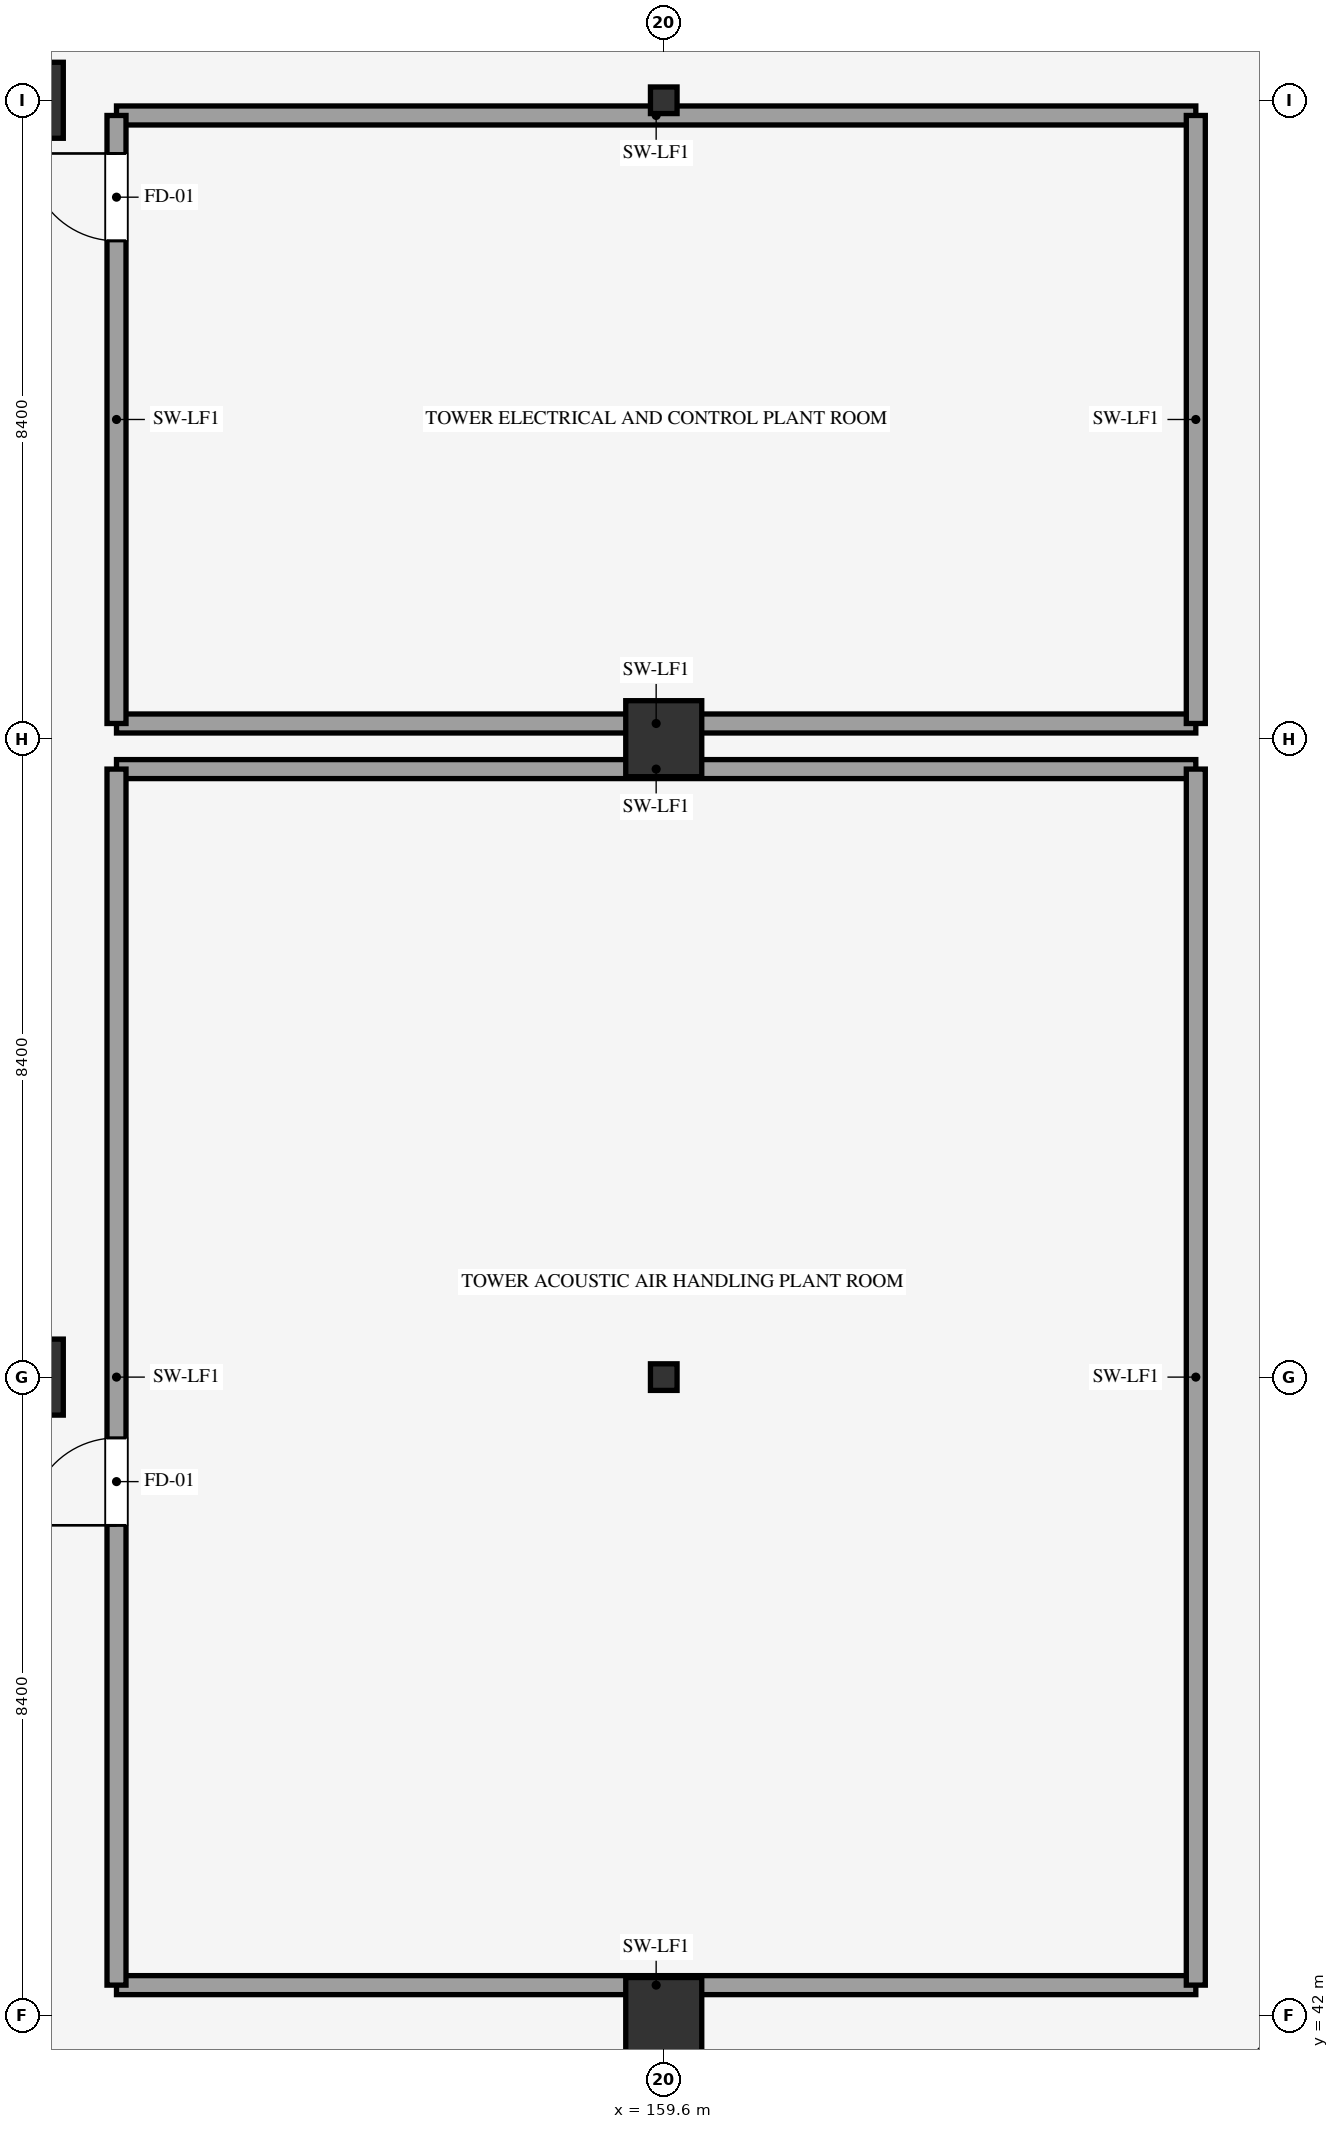
"""IFC4 building model, lengths in metres.
Left out: names, types, materials, properties, quantities, classifications, styles, units other than length and angle.
Written with IfcOpenShell. Run it as: python <this file> out.ifc"""

import sys

from ifc_helpers import new_model, si_unit, direction, frame, frame_2d, origin, origin_2d, place, context, subcontext, project, spatial, rectangle, i_section, extrude, element, fill, save


model = new_model("IFC4")
c1 = context("Model", 3, precision=1e-05, world=origin(), true_north=direction((0.0, 1.0)))
c2 = subcontext(c1, "Body", "Model", "MODEL_VIEW")
j1 = project(units=[si_unit("LENGTHUNIT", "METRE"), si_unit("PLANEANGLEUNIT", "RADIAN")], contexts=[c1])
p1 = place(None, origin())
s1 = spatial("IfcSite", under=j1, at=p1, CompositionType="ELEMENT")
p2 = place(p1, origin())
s2 = spatial("IfcBuilding", under=s1, at=p2, CompositionType="ELEMENT")
p3 = place(p2, frame((0.0, 0.0, 40.5)))
s3 = spatial("IfcBuildingStorey", under=s2, at=p3, CompositionType="ELEMENT", Elevation=40.5)
for number, where, z_axis, x_axis in (
    (1, (151.2, 50.4, 0.0), (0.0, 0.0, 1.0), (1.0, 0.0, 0.0)),
    (2, (151.2, 67.2, 0.0), (0.0, 0.0, 1.0), (1.0, 0.0, 0.0)),
    (3, (159.6, 42.0, 0.0), (0.0, 0.0, 1.0), (1.0, 0.0, 0.0)),
):
    element("IfcColumn", number, at=place(p3, frame(where, z_axis=z_axis, x_axis=x_axis)), inside=s3, PredefinedType="COLUMN", context=c2, shape_type="SweptSolid", body=[
        extrude(rectangle(XDim=1.0, YDim=1.0, at=origin_2d()), origin(), (0.0, 0.0, 1.0), 4.2),
    ])
p4 = place(p3, frame((159.6, 50.4, 0.0), z_axis=(0.0, 0.0, 1.0), x_axis=(1.0, 0.0, 0.0)))
e4 = element("IfcColumn", 4, at=p4, inside=s3, PredefinedType="COLUMN", context=c2, shape_type="SweptSolid", body=[
    extrude(i_section(OverallWidth=0.35, OverallDepth=0.35, WebThickness=0.012, FlangeThickness=0.019, FilletRadius=0.02, at=origin_2d()), origin(), (0.0, 0.0, 1.0), 4.2),
])
p5 = place(p3, frame((159.6, 58.8, 0.0), z_axis=(0.0, 0.0, 1.0), x_axis=(1.0, 0.0, 0.0)))
e5 = element("IfcColumn", 5, at=p5, inside=s3, PredefinedType="COLUMN", context=c2, shape_type="SweptSolid", body=[
    extrude(rectangle(XDim=1.0, YDim=1.0, at=origin_2d()), origin(), (0.0, 0.0, 1.0), 4.2),
])
p6 = place(p3, frame((159.6, 67.2, 0.0), z_axis=(0.0, 0.0, 1.0), x_axis=(1.0, 0.0, 0.0)))
e6 = element("IfcColumn", 6, at=p6, inside=s3, PredefinedType="COLUMN", context=c2, shape_type="SweptSolid", body=[
    extrude(i_section(OverallWidth=0.35, OverallDepth=0.35, WebThickness=0.012, FlangeThickness=0.019, FilletRadius=0.02, at=origin_2d()), origin(), (0.0, 0.0, 1.0), 4.2),
])
for number, where, z_axis, x_axis in (
    (7, (152.4, 42.4, 0.0), (0.0, 0.0, 1.0), (1.0, 0.0, 0.0)),
    (8, (152.4, 58.4, 0.0), (0.0, 0.0, 1.0), (1.0, 0.0, 0.0)),
):
    element("IfcWall", number, at=place(p3, frame(where, z_axis=z_axis, x_axis=x_axis)), inside=s3, PredefinedType="SHEAR", context=c2, shape_type="SweptSolid", body=[
        extrude(rectangle(XDim=14.2, YDim=0.25, at=frame_2d((7.1, 0.0))), origin(), (0.0, 0.0, 1.0), 3.96),
    ])
p7 = place(p3, frame((152.4, 42.4, 0.0), z_axis=(0.0, 0.0, 1.0), x_axis=(0.0, 1.0, 0.0)))
e9 = element("IfcWall", 9, at=p7, inside=s3, PredefinedType="SHEAR", context=c2, shape_type="SweptSolid", body=[
    extrude(rectangle(XDim=16.0, YDim=0.25, at=frame_2d((8.0, 0.0))), origin(), (0.0, 0.0, 1.0), 3.96),
])
p8 = place(p7, frame((6.05, 0.0, 0.0)))
e10 = element("IfcOpeningElement", 10, at=p8, cuts=e9, PredefinedType="OPENING", context=c2, shape_type="SweptSolid", body=[
    extrude(rectangle(XDim=1.15, YDim=2.15, at=frame_2d((0.575, 1.075))), frame((0.0, 0.135, 0.0), z_axis=(0.0, -1.0, 0.0), x_axis=(1.0, 0.0, 0.0)), (0.0, 0.0, 1.0), 0.27),
])
p9 = place(p3, frame((166.6, 42.4, 0.0), z_axis=(0.0, 0.0, 1.0), x_axis=(0.0, 1.0, 0.0)))
e11 = element("IfcWall", 11, at=p9, inside=s3, PredefinedType="SHEAR", context=c2, shape_type="SweptSolid", body=[
    extrude(rectangle(XDim=16.0, YDim=0.25, at=frame_2d((8.0, 0.0))), origin(), (0.0, 0.0, 1.0), 3.96),
])
for number, where, z_axis, x_axis in (
    (12, (152.4, 59.0, 0.0), (0.0, 0.0, 1.0), (1.0, 0.0, 0.0)),
    (13, (152.4, 67.0, 0.0), (0.0, 0.0, 1.0), (1.0, 0.0, 0.0)),
):
    element("IfcWall", number, at=place(p3, frame(where, z_axis=z_axis, x_axis=x_axis)), inside=s3, PredefinedType="SHEAR", context=c2, shape_type="SweptSolid", body=[
        extrude(rectangle(XDim=14.2, YDim=0.25, at=frame_2d((7.1, 0.0))), origin(), (0.0, 0.0, 1.0), 3.96),
    ])
p10 = place(p3, frame((152.4, 59.0, 0.0), z_axis=(0.0, 0.0, 1.0), x_axis=(0.0, 1.0, 0.0)))
e14 = element("IfcWall", 14, at=p10, inside=s3, PredefinedType="SHEAR", context=c2, shape_type="SweptSolid", body=[
    extrude(rectangle(XDim=8.0, YDim=0.25, at=frame_2d((4.0, 0.0))), origin(), (0.0, 0.0, 1.0), 3.96),
])
p11 = place(p10, frame((6.35, 0.0, 0.0)))
e15 = element("IfcOpeningElement", 15, at=p11, cuts=e14, PredefinedType="OPENING", context=c2, shape_type="SweptSolid", body=[
    extrude(rectangle(XDim=1.15, YDim=2.15, at=frame_2d((0.575, 1.075))), frame((0.0, 0.135, 0.0), z_axis=(0.0, -1.0, 0.0), x_axis=(1.0, 0.0, 0.0)), (0.0, 0.0, 1.0), 0.27),
])
p12 = place(p3, frame((166.6, 59.0, 0.0), z_axis=(0.0, 0.0, 1.0), x_axis=(0.0, 1.0, 0.0)))
e16 = element("IfcWall", 16, at=p12, inside=s3, PredefinedType="SHEAR", context=c2, shape_type="SweptSolid", body=[
    extrude(rectangle(XDim=8.0, YDim=0.25, at=frame_2d((4.0, 0.0))), origin(), (0.0, 0.0, 1.0), 3.96),
])
p13 = place(p8, origin())
e17 = element("IfcDoor", 17, at=p13, inside=s3, OperationType="SINGLE_SWING_LEFT", PredefinedType="DOOR", context=c2, shape_type="SweptSolid", body=[
    extrude(rectangle(XDim=1.15, YDim=2.15, at=frame_2d((0.575, 1.075))), frame((0.0, 0.025, 0.0), z_axis=(0.0, -1.0, 0.0), x_axis=(1.0, 0.0, 0.0)), (0.0, 0.0, 1.0), 0.05),
])
fill(e10, e17)
p14 = place(p11, origin())
e18 = element("IfcDoor", 18, at=p14, inside=s3, OperationType="SINGLE_SWING_RIGHT", PredefinedType="DOOR", context=c2, shape_type="SweptSolid", body=[
    extrude(rectangle(XDim=1.15, YDim=2.15, at=frame_2d((0.575, 1.075))), frame((0.0, 0.025, 0.0), z_axis=(0.0, -1.0, 0.0), x_axis=(1.0, 0.0, 0.0)), (0.0, 0.0, 1.0), 0.05),
])
fill(e15, e18)
save(model, sys.argv[1])
